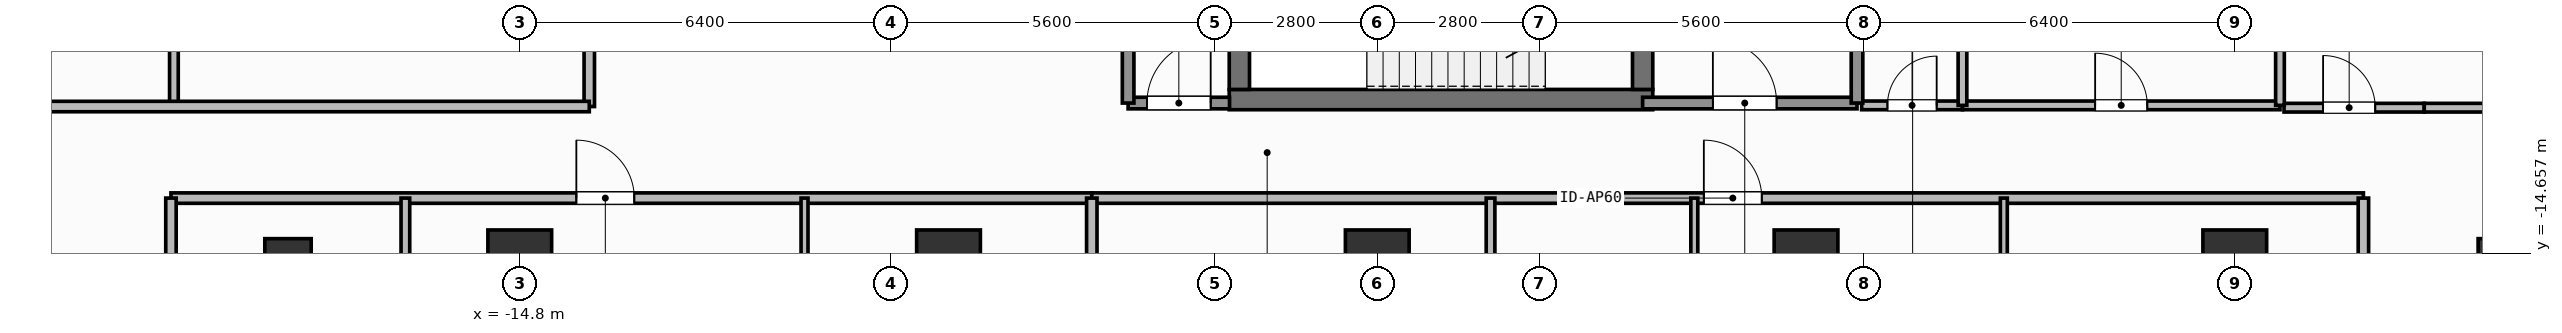
"""IFC4 building model, lengths in metres.
Left out: names, types, materials, properties, quantities, classifications, styles, units other than length and angle.
Written with IfcOpenShell. Run it as: python <this file> out.ifc"""

import sys

from ifc_helpers import new_model, si_unit, direction, frame, frame_2d, origin, origin_2d, place, context, subcontext, project, spatial, rectangle, hollow_rectangle, extrude, element, fill, save


model = new_model("IFC4")
c1 = context("Model", 3, precision=1e-05, world=origin(), true_north=direction((0.0, 1.0)))
c2 = subcontext(c1, "Body", "Model", "MODEL_VIEW")
j1 = project(units=[si_unit("LENGTHUNIT", "METRE"), si_unit("PLANEANGLEUNIT", "RADIAN")], contexts=[c1])
p1 = place(None, origin())
s1 = spatial("IfcSite", under=j1, at=p1, CompositionType="ELEMENT")
p2 = place(p1, origin())
s2 = spatial("IfcBuilding", under=s1, at=p2, CompositionType="ELEMENT")
p3 = place(p2, frame((0.0, 0.0, 191.4)))
s3 = spatial("IfcBuildingStorey", under=s2, at=p3, CompositionType="ELEMENT", Elevation=191.4)
p4 = place(p3, frame((-2.555, -12.0, 0.0), z_axis=(0.0, 0.0, 1.0), x_axis=(1.0, 0.0, 0.0)))
e1 = element("IfcWall", 1, at=p4, inside=s3, PredefinedType="SHEAR", context=c2, shape_type="SweptSolid", body=[
    extrude(rectangle(XDim=7.31, YDim=0.35, at=frame_2d((3.655, 0.0))), origin(), (0.0, 0.0, 1.0), 3.9),
])
p5 = place(p3, frame((-2.38, -11.825, 0.0), z_axis=(0.0, 0.0, 1.0), x_axis=(0.0, 1.0, 0.0)))
e2 = element("IfcWall", 2, at=p5, inside=s3, PredefinedType="SHEAR", context=c2, shape_type="SweptSolid", body=[
    extrude(rectangle(XDim=2.925, YDim=0.35, at=frame_2d((1.462, 0.0))), origin(), (0.0, 0.0, 1.0), 3.9),
])
p6 = place(p3, frame((4.58, -8.9, 0.0), z_axis=(0.0, 0.0, 1.0), x_axis=(0.0, -1.0, 0.0)))
e3 = element("IfcWall", 3, at=p6, inside=s3, PredefinedType="SHEAR", context=c2, shape_type="SweptSolid", body=[
    extrude(rectangle(XDim=2.925, YDim=0.35, at=frame_2d((1.462, 0.0))), origin(), (0.0, 0.0, 1.0), 3.9),
])
p7 = place(p6, frame((0.913, 0.0, 0.0)))
e4 = element("IfcOpeningElement", 4, at=p7, cuts=e3, PredefinedType="OPENING", context=c2, shape_type="SweptSolid", body=[
    extrude(rectangle(XDim=1.1, YDim=2.15, at=frame_2d((0.55, 1.075))), frame((0.0, 0.185, 0.0), z_axis=(0.0, -1.0, 0.0), x_axis=(1.0, 0.0, 0.0)), (0.0, 0.0, 1.0), 0.37),
])
for number, where, z_axis, x_axis in (
    (5, (-14.8, -14.8, 0.0), (0.0, 0.0, 1.0), (1.0, 0.0, 0.0)),
    (6, (-7.4, -14.8, 0.0), (0.0, 0.0, 1.0), (1.0, 0.0, 0.0)),
    (7, (0.0, -14.8, 0.0), (0.0, 0.0, 1.0), (1.0, 0.0, 0.0)),
    (8, (7.4, -14.8, 0.0), (0.0, 0.0, 1.0), (1.0, 0.0, 0.0)),
    (9, (14.8, -14.8, 0.0), (0.0, 0.0, 1.0), (1.0, 0.0, 0.0)),
):
    element("IfcColumn", number, at=place(p3, frame(where, z_axis=z_axis, x_axis=x_axis)), inside=s3, PredefinedType="COLUMN", context=c2, shape_type="SweptSolid", body=[
        extrude(rectangle(XDim=1.1, YDim=1.1, at=origin_2d()), origin(), (0.0, 0.0, 1.0), 3.9),
    ])
for number, where, z_axis, x_axis in (
    (10, (-18.8, -14.8, 0.0), (0.0, 0.0, 1.0), (1.0, 0.0, 0.0)),
    (11, (19.4, -14.8, 0.0), (0.0, 0.0, 1.0), (1.0, 0.0, 0.0)),
):
    element("IfcColumn", number, at=place(p3, frame(where, z_axis=z_axis, x_axis=x_axis)), inside=s3, PredefinedType="COLUMN", context=c2, shape_type="SweptSolid", body=[
        extrude(hollow_rectangle(XDim=0.8, YDim=0.8, WallThickness=0.036, at=origin_2d()), origin(), (0.0, 0.0, 1.0), 3.9),
    ])
p8 = place(p3, frame((4.58, -12.06, 0.0), z_axis=(0.0, 0.0, 1.0), x_axis=(1.0, 0.0, 0.0)))
e12 = element("IfcWall", 12, at=p8, inside=s3, PredefinedType="SOLIDWALL", context=c2, shape_type="SweptSolid", body=[
    extrude(rectangle(XDim=3.7, YDim=0.2, at=frame_2d((1.85, 0.0))), origin(), (0.0, 0.0, 1.0), 3.68),
])
p9 = place(p8, frame((1.212, 0.0, 0.0)))
e13 = element("IfcOpeningElement", 13, at=p9, cuts=e12, PredefinedType="OPENING", context=c2, shape_type="SweptSolid", body=[
    extrude(rectangle(XDim=1.1, YDim=2.15, at=frame_2d((0.55, 1.075))), frame((0.0, 0.11, 0.0), z_axis=(0.0, -1.0, 0.0), x_axis=(1.0, 0.0, 0.0)), (0.0, 0.0, 1.0), 0.22),
])
p10 = place(p3, frame((-4.3, -12.06, 0.0), z_axis=(0.0, 0.0, 1.0), x_axis=(1.0, 0.0, 0.0)))
e14 = element("IfcWall", 14, at=p10, inside=s3, PredefinedType="SOLIDWALL", context=c2, shape_type="SweptSolid", body=[
    extrude(rectangle(XDim=1.75, YDim=0.2, at=frame_2d((0.875, 0.0))), origin(), (0.0, 0.0, 1.0), 3.68),
])
p11 = place(p10, frame((0.325, 0.0, 0.0)))
e15 = element("IfcOpeningElement", 15, at=p11, cuts=e14, PredefinedType="OPENING", context=c2, shape_type="SweptSolid", body=[
    extrude(rectangle(XDim=1.1, YDim=2.15, at=frame_2d((0.55, 1.075))), frame((0.0, 0.11, 0.0), z_axis=(0.0, -1.0, 0.0), x_axis=(1.0, 0.0, 0.0)), (0.0, 0.0, 1.0), 0.22),
])
p12 = place(p3, frame((8.36, -12.1, 0.0), z_axis=(0.0, 0.0, 1.0), x_axis=(1.0, 0.0, 0.0)))
e16 = element("IfcWall", 16, at=p12, inside=s3, PredefinedType="PARTITIONING", context=c2, shape_type="SweptSolid", body=[
    extrude(rectangle(XDim=1.74, YDim=0.15, at=frame_2d((0.87, 0.0))), origin(), (0.0, 0.0, 1.0), 3.68),
])
p13 = place(p12, frame((0.445, 0.0, 0.0)))
e17 = element("IfcOpeningElement", 17, at=p13, cuts=e16, PredefinedType="OPENING", context=c2, shape_type="SweptSolid", body=[
    extrude(rectangle(XDim=0.85, YDim=2.1, at=frame_2d((0.425, 1.05))), frame((0.0, 0.085, 0.0), z_axis=(0.0, -1.0, 0.0), x_axis=(1.0, 0.0, 0.0)), (0.0, 0.0, 1.0), 0.17),
])
p14 = place(p3, frame((10.1, -12.1, 0.0), z_axis=(0.0, 0.0, 1.0), x_axis=(1.0, 0.0, 0.0)))
e18 = element("IfcWall", 18, at=p14, inside=s3, PredefinedType="PARTITIONING", context=c2, shape_type="SweptSolid", body=[
    extrude(rectangle(XDim=5.48, YDim=0.15, at=frame_2d((2.74, 0.0))), origin(), (0.0, 0.0, 1.0), 3.68),
])
p15 = place(p14, frame((2.29, 0.0, 0.0)))
e19 = element("IfcOpeningElement", 19, at=p15, cuts=e18, PredefinedType="OPENING", context=c2, shape_type="SweptSolid", body=[
    extrude(rectangle(XDim=0.9, YDim=2.1, at=frame_2d((0.45, 1.05))), frame((0.0, 0.085, 0.0), z_axis=(0.0, -1.0, 0.0), x_axis=(1.0, 0.0, 0.0)), (0.0, 0.0, 1.0), 0.17),
])
p16 = place(p3, frame((-20.82, -13.7, 0.0), z_axis=(0.0, 0.0, 1.0), x_axis=(1.0, 0.0, 0.0)))
e20 = element("IfcWall", 20, at=p16, inside=s3, PredefinedType="PARTITIONING", context=c2, shape_type="SweptSolid", body=[
    extrude(rectangle(XDim=15.893, YDim=0.18, at=frame_2d((7.947, 0.0))), origin(), (0.0, 0.0, 1.0), 3.68),
])
p17 = place(p16, frame((6.997, 0.0, 0.0)))
e21 = element("IfcOpeningElement", 21, at=p17, cuts=e20, PredefinedType="OPENING", context=c2, shape_type="SweptSolid", body=[
    extrude(rectangle(XDim=1.0, YDim=2.2, at=frame_2d((0.5, 1.1))), frame((0.0, 0.1, 0.0), z_axis=(0.0, -1.0, 0.0), x_axis=(1.0, 0.0, 0.0)), (0.0, 0.0, 1.0), 0.2),
])
p18 = place(p3, frame((-16.774, -24.39, 0.0), z_axis=(0.0, 0.0, 1.0), x_axis=(0.0, 1.0, 0.0)))
e22 = element("IfcWall", 22, at=p18, inside=s3, PredefinedType="PARTITIONING", context=c2, shape_type="SweptSolid", body=[
    extrude(rectangle(XDim=10.69, YDim=0.15, at=frame_2d((5.345, 0.0))), origin(), (0.0, 0.0, 1.0), 3.68),
])
p19 = place(p18, frame((4.83, 0.0, 0.0)))
e23 = element("IfcOpeningElement", 23, at=p19, cuts=e22, PredefinedType="OPENING", context=c2, shape_type="SweptSolid", body=[
    extrude(rectangle(XDim=0.85, YDim=2.1, at=frame_2d((0.425, 1.05))), frame((0.0, 0.085, 0.0), z_axis=(0.0, -1.0, 0.0), x_axis=(1.0, 0.0, 0.0)), (0.0, 0.0, 1.0), 0.17),
])
p20 = place(p3, frame((-9.885, -18.19, 0.0), z_axis=(0.0, 0.0, 1.0), x_axis=(0.0, 1.0, 0.0)))
e24 = element("IfcWall", 24, at=p20, inside=s3, PredefinedType="PARTITIONING", context=c2, shape_type="SweptSolid", body=[
    extrude(rectangle(XDim=4.49, YDim=0.12, at=frame_2d((2.245, 0.0))), origin(), (0.0, 0.0, 1.0), 3.68),
])
p21 = place(p20, frame((1.907, 0.0, 0.0)))
e25 = element("IfcOpeningElement", 25, at=p21, cuts=e24, PredefinedType="OPENING", context=c2, shape_type="SweptSolid", body=[
    extrude(rectangle(XDim=0.85, YDim=2.1, at=frame_2d((0.425, 1.05))), frame((0.0, 0.07, 0.0), z_axis=(0.0, -1.0, 0.0), x_axis=(1.0, 0.0, 0.0)), (0.0, 0.0, 1.0), 0.14),
])
p22 = place(p3, frame((-4.927, -13.7, 0.0), z_axis=(0.0, 0.0, 1.0), x_axis=(1.0, 0.0, 0.0)))
e26 = element("IfcWall", 26, at=p22, inside=s3, PredefinedType="PARTITIONING", context=c2, shape_type="SweptSolid", body=[
    extrude(rectangle(XDim=21.947, YDim=0.18, at=frame_2d((10.974, 0.0))), origin(), (0.0, 0.0, 1.0), 3.68),
])
p23 = place(p22, frame((10.563, 0.0, 0.0)))
e27 = element("IfcOpeningElement", 27, at=p23, cuts=e26, PredefinedType="OPENING", context=c2, shape_type="SweptSolid", body=[
    extrude(rectangle(XDim=1.0, YDim=2.2, at=frame_2d((0.5, 1.1))), frame((0.0, 0.1, 0.0), z_axis=(0.0, -1.0, 0.0), x_axis=(1.0, 0.0, 0.0)), (0.0, 0.0, 1.0), 0.2),
])
p24 = place(p3, frame((5.472, -24.39, 0.0), z_axis=(0.0, 0.0, 1.0), x_axis=(0.0, 1.0, 0.0)))
e28 = element("IfcWall", 28, at=p24, inside=s3, PredefinedType="PARTITIONING", context=c2, shape_type="SweptSolid", body=[
    extrude(rectangle(XDim=10.69, YDim=0.12, at=frame_2d((5.345, 0.0))), origin(), (0.0, 0.0, 1.0), 3.68),
])
p25 = place(p24, frame((4.806, 0.0, 0.0)))
e29 = element("IfcOpeningElement", 29, at=p25, cuts=e28, PredefinedType="OPENING", context=c2, shape_type="SweptSolid", body=[
    extrude(rectangle(XDim=0.9, YDim=2.1, at=frame_2d((0.45, 1.05))), frame((0.0, 0.07, 0.0), z_axis=(0.0, -1.0, 0.0), x_axis=(1.0, 0.0, 0.0)), (0.0, 0.0, 1.0), 0.14),
])
p26 = place(p3, frame((1.955, -19.45, 0.0), z_axis=(0.0, 0.0, 1.0), x_axis=(0.0, 1.0, 0.0)))
e30 = element("IfcWall", 30, at=p26, inside=s3, PredefinedType="PARTITIONING", context=c2, shape_type="SweptSolid", body=[
    extrude(rectangle(XDim=5.75, YDim=0.15, at=frame_2d((2.875, 0.0))), origin(), (0.0, 0.0, 1.0), 3.68),
])
p27 = place(p26, frame((2.45, 0.0, 0.0)))
e31 = element("IfcOpeningElement", 31, at=p27, cuts=e30, PredefinedType="OPENING", context=c2, shape_type="SweptSolid", body=[
    extrude(rectangle(XDim=0.85, YDim=2.1, at=frame_2d((0.425, 1.05))), frame((0.0, 0.085, 0.0), z_axis=(0.0, -1.0, 0.0), x_axis=(1.0, 0.0, 0.0)), (0.0, 0.0, 1.0), 0.17),
])
p28 = place(p3, frame((10.814, -18.19, 0.0), z_axis=(0.0, 0.0, 1.0), x_axis=(0.0, 1.0, 0.0)))
e32 = element("IfcWall", 32, at=p28, inside=s3, PredefinedType="PARTITIONING", context=c2, shape_type="SweptSolid", body=[
    extrude(rectangle(XDim=4.49, YDim=0.12, at=frame_2d((2.245, 0.0))), origin(), (0.0, 0.0, 1.0), 3.68),
])
p29 = place(p28, frame((1.907, 0.0, 0.0)))
e33 = element("IfcOpeningElement", 33, at=p29, cuts=e32, PredefinedType="OPENING", context=c2, shape_type="SweptSolid", body=[
    extrude(rectangle(XDim=0.85, YDim=2.1, at=frame_2d((0.425, 1.05))), frame((0.0, 0.07, 0.0), z_axis=(0.0, -1.0, 0.0), x_axis=(1.0, 0.0, 0.0)), (0.0, 0.0, 1.0), 0.14),
])
p30 = place(p3, frame((-13.6, -12.12, 0.0), z_axis=(0.0, 0.0, 1.0), x_axis=(0.0, 1.0, 0.0)))
e34 = element("IfcWall", 34, at=p30, inside=s3, PredefinedType="PARTITIONING", context=c2, shape_type="SweptSolid", body=[
    extrude(rectangle(XDim=12.764, YDim=0.18, at=frame_2d((6.382, 0.0))), origin(), (0.0, 0.0, 1.0), 3.68),
])
p31 = place(p30, frame((5.346, 0.0, 0.0)))
e35 = element("IfcOpeningElement", 35, at=p31, cuts=e34, PredefinedType="OPENING", context=c2, shape_type="SweptSolid", body=[
    extrude(rectangle(XDim=1.0, YDim=2.2, at=frame_2d((0.5, 1.1))), frame((0.0, 0.1, 0.0), z_axis=(0.0, -1.0, 0.0), x_axis=(1.0, 0.0, 0.0)), (0.0, 0.0, 1.0), 0.2),
])
p32 = place(p3, frame((15.65, -12.14, 0.0), z_axis=(0.0, 0.0, 1.0), x_axis=(1.0, 0.0, 0.0)))
e36 = element("IfcWall", 36, at=p32, inside=s3, PredefinedType="PARTITIONING", context=c2, shape_type="SweptSolid", body=[
    extrude(rectangle(XDim=2.42, YDim=0.15, at=frame_2d((1.21, 0.0))), origin(), (0.0, 0.0, 1.0), 3.68),
])
p33 = place(p32, frame((0.674, 0.0, 0.0)))
e37 = element("IfcOpeningElement", 37, at=p33, cuts=e36, PredefinedType="OPENING", context=c2, shape_type="SweptSolid", body=[
    extrude(rectangle(XDim=0.9, YDim=2.1, at=frame_2d((0.45, 1.05))), frame((0.0, 0.085, 0.0), z_axis=(0.0, -1.0, 0.0), x_axis=(1.0, 0.0, 0.0)), (0.0, 0.0, 1.0), 0.17),
])
for number, where, z_axis, x_axis in (
    (38, (8.28, -12.06, 0.0), (0.0, 0.0, 1.0), (0.0, 1.0, 0.0)),
    (39, (-4.3, -12.06, 0.0), (0.0, 0.0, 1.0), (0.0, 1.0, 0.0)),
):
    element("IfcWall", number, at=place(p3, frame(where, z_axis=z_axis, x_axis=x_axis)), inside=s3, PredefinedType="SOLIDWALL", context=c2, shape_type="SweptSolid", body=[
        extrude(rectangle(XDim=3.26, YDim=0.2, at=frame_2d((1.63, 0.0))), origin(), (0.0, 0.0, 1.0), 3.68),
    ])
p34 = place(p3, frame((10.1, -12.1, 0.0), z_axis=(0.0, 0.0, 1.0), x_axis=(0.0, 1.0, 0.0)))
e40 = element("IfcWall", 40, at=p34, inside=s3, PredefinedType="PARTITIONING", context=c2, shape_type="SweptSolid", body=[
    extrude(rectangle(XDim=2.35, YDim=0.15, at=frame_2d((1.175, 0.0))), origin(), (0.0, 0.0, 1.0), 3.68),
])
p35 = place(p3, frame((15.58, -12.1, 0.0), z_axis=(0.0, 0.0, 1.0), x_axis=(0.0, 1.0, 0.0)))
e41 = element("IfcWall", 41, at=p35, inside=s3, PredefinedType="PARTITIONING", context=c2, shape_type="SweptSolid", body=[
    extrude(rectangle(XDim=6.25, YDim=0.15, at=frame_2d((3.125, 0.0))), origin(), (0.0, 0.0, 1.0), 3.68),
])
p36 = place(p3, frame((-4.927, -28.63, 0.0), z_axis=(0.0, 0.0, 1.0), x_axis=(0.0, 1.0, 0.0)))
e42 = element("IfcWall", 42, at=p36, inside=s3, PredefinedType="PARTITIONING", context=c2, shape_type="SweptSolid", body=[
    extrude(rectangle(XDim=14.93, YDim=0.18, at=frame_2d((7.465, 0.0))), origin(), (0.0, 0.0, 1.0), 3.68),
])
for number, where, z_axis, x_axis in (
    (43, (-20.82, -27.51, 0.0), (0.0, 0.0, 1.0), (0.0, 1.0, 0.0)),
    (44, (17.02, -27.51, 0.0), (0.0, 0.0, 1.0), (0.0, 1.0, 0.0)),
):
    element("IfcWall", number, at=place(p3, frame(where, z_axis=z_axis, x_axis=x_axis)), inside=s3, PredefinedType="PARTITIONING", context=c2, shape_type="SweptSolid", body=[
        extrude(rectangle(XDim=13.81, YDim=0.18, at=frame_2d((6.905, 0.0))), origin(), (0.0, 0.0, 1.0), 3.68),
    ])
p37 = place(p3, frame((-20.769, -12.12, 0.0), z_axis=(0.0, 0.0, 1.0), x_axis=(0.0, 1.0, 0.0)))
e45 = element("IfcWall", 45, at=p37, inside=s3, PredefinedType="PARTITIONING", context=c2, shape_type="SweptSolid", body=[
    extrude(rectangle(XDim=3.284, YDim=0.15, at=frame_2d((1.642, 0.0))), origin(), (0.0, 0.0, 1.0), 3.68),
])
p38 = place(p3, frame((-24.13, -12.12, 0.0), z_axis=(0.0, 0.0, 1.0), x_axis=(1.0, 0.0, 0.0)))
e46 = element("IfcWall", 46, at=p38, inside=s3, PredefinedType="PARTITIONING", context=c2, shape_type="SweptSolid", body=[
    extrude(rectangle(XDim=10.53, YDim=0.18, at=frame_2d((5.265, 0.0))), origin(), (0.0, 0.0, 1.0), 3.68),
])
p39 = place(p3, frame((18.07, -12.14, 0.0), z_axis=(0.0, 0.0, 1.0), x_axis=(1.0, 0.0, 0.0)))
e47 = element("IfcWall", 47, at=p39, inside=s3, PredefinedType="PARTITIONING", context=c2, shape_type="SweptSolid", body=[
    extrude(rectangle(XDim=2.26, YDim=0.15, at=frame_2d((1.13, 0.0))), origin(), (0.0, 0.0, 1.0), 3.68),
])
p40 = place(p9, origin())
e48 = element("IfcDoor", 48, at=p40, inside=s3, OperationType="SINGLE_SWING_LEFT", PredefinedType="DOOR", context=c2, shape_type="SweptSolid", body=[
    extrude(rectangle(XDim=1.1, YDim=2.15, at=frame_2d((0.55, 1.075))), frame((0.0, 0.025, 0.0), z_axis=(0.0, -1.0, 0.0), x_axis=(1.0, 0.0, 0.0)), (0.0, 0.0, 1.0), 0.05),
])
fill(e13, e48)
p41 = place(p11, origin())
e49 = element("IfcDoor", 49, at=p41, inside=s3, OperationType="SINGLE_SWING_RIGHT", PredefinedType="DOOR", context=c2, shape_type="SweptSolid", body=[
    extrude(rectangle(XDim=1.1, YDim=2.15, at=frame_2d((0.55, 1.075))), frame((0.0, 0.025, 0.0), z_axis=(0.0, -1.0, 0.0), x_axis=(1.0, 0.0, 0.0)), (0.0, 0.0, 1.0), 0.05),
])
fill(e15, e49)
p42 = place(p13, origin())
e50 = element("IfcDoor", 50, at=p42, inside=s3, OperationType="SINGLE_SWING_RIGHT", PredefinedType="DOOR", context=c2, shape_type="SweptSolid", body=[
    extrude(rectangle(XDim=0.85, YDim=2.1, at=frame_2d((0.425, 1.05))), frame((0.0, 0.025, 0.0), z_axis=(0.0, -1.0, 0.0), x_axis=(1.0, 0.0, 0.0)), (0.0, 0.0, 1.0), 0.05),
])
fill(e17, e50)
p43 = place(p15, origin())
e51 = element("IfcDoor", 51, at=p43, inside=s3, OperationType="SINGLE_SWING_LEFT", PredefinedType="DOOR", context=c2, shape_type="SweptSolid", body=[
    extrude(rectangle(XDim=0.9, YDim=2.1, at=frame_2d((0.45, 1.05))), frame((0.0, 0.025, 0.0), z_axis=(0.0, -1.0, 0.0), x_axis=(1.0, 0.0, 0.0)), (0.0, 0.0, 1.0), 0.05),
])
fill(e19, e51)
p44 = place(p17, origin())
e52 = element("IfcDoor", 52, at=p44, inside=s3, OperationType="SINGLE_SWING_LEFT", PredefinedType="DOOR", context=c2, shape_type="SweptSolid", body=[
    extrude(rectangle(XDim=1.0, YDim=2.2, at=frame_2d((0.5, 1.1))), frame((0.0, 0.025, 0.0), z_axis=(0.0, -1.0, 0.0), x_axis=(1.0, 0.0, 0.0)), (0.0, 0.0, 1.0), 0.05),
])
fill(e21, e52)
p45 = place(p23, origin())
e53 = element("IfcDoor", 53, at=p45, inside=s3, OperationType="SINGLE_SWING_LEFT", PredefinedType="DOOR", context=c2, shape_type="SweptSolid", body=[
    extrude(rectangle(XDim=1.0, YDim=2.2, at=frame_2d((0.5, 1.1))), frame((0.0, 0.025, 0.0), z_axis=(0.0, -1.0, 0.0), x_axis=(1.0, 0.0, 0.0)), (0.0, 0.0, 1.0), 0.05),
])
fill(e27, e53)
p46 = place(p33, origin())
e54 = element("IfcDoor", 54, at=p46, inside=s3, OperationType="SINGLE_SWING_LEFT", PredefinedType="DOOR", context=c2, shape_type="SweptSolid", body=[
    extrude(rectangle(XDim=0.9, YDim=2.1, at=frame_2d((0.45, 1.05))), frame((0.0, 0.025, 0.0), z_axis=(0.0, -1.0, 0.0), x_axis=(1.0, 0.0, 0.0)), (0.0, 0.0, 1.0), 0.05),
])
fill(e37, e54)
save(model, sys.argv[1])
